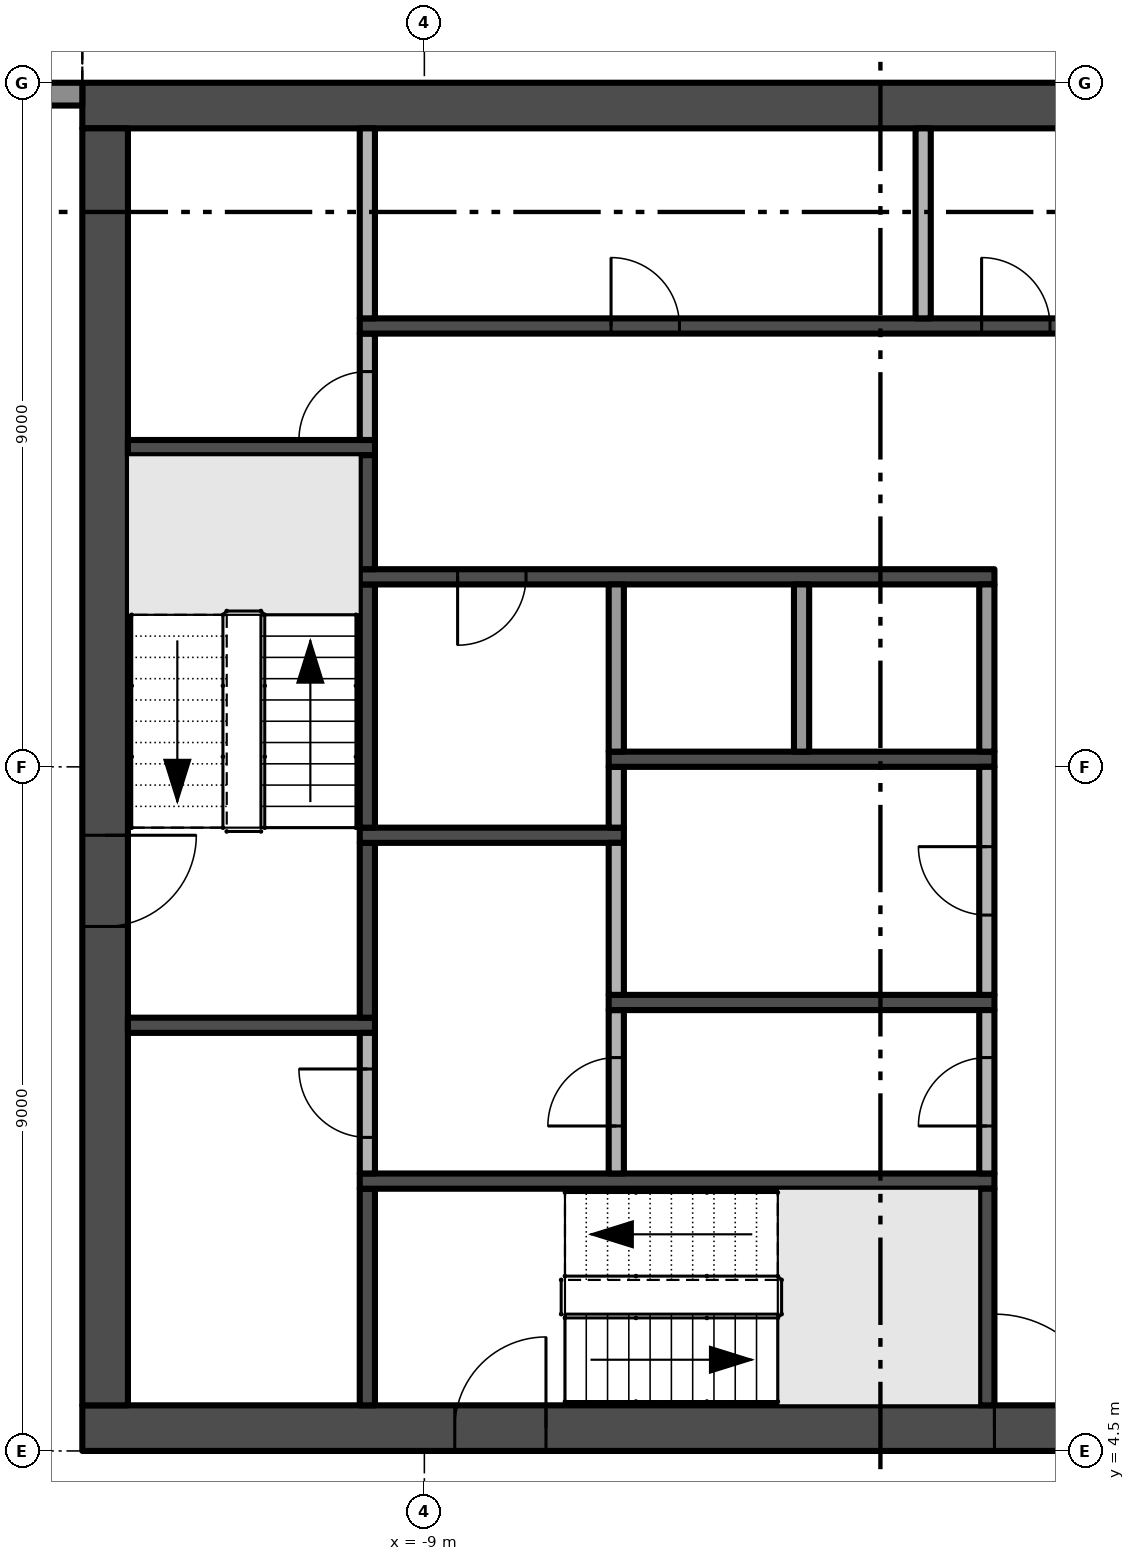
"""IFC4 building model, lengths in metres.
Left out: names, types, materials, properties, quantities, classifications, styles, units other than length and angle.
Written with IfcOpenShell. Run it as: python <this file> out.ifc"""

import sys

from ifc_helpers import new_model, si_unit, direction, frame, frame_2d, origin, place, context, subcontext, project, spatial, rectangle, extrude, element, fill, save


model = new_model("IFC4")
c1 = context("Model", 3, precision=1e-05, world=origin(), true_north=direction((0.0, 1.0)))
c2 = subcontext(c1, "Body", "Model", "MODEL_VIEW")
j1 = project(units=[si_unit("LENGTHUNIT", "METRE"), si_unit("PLANEANGLEUNIT", "RADIAN")], contexts=[c1])
p1 = place(None, origin())
s1 = spatial("IfcSite", under=j1, at=p1, CompositionType="ELEMENT")
p2 = place(p1, origin())
s2 = spatial("IfcBuilding", under=s1, at=p2, CompositionType="ELEMENT")
p3 = place(p2, frame((0.0, 0.0, 211.0)))
s3 = spatial("IfcBuildingStorey", under=s2, at=p3, CompositionType="ELEMENT", Elevation=211.0)
p4 = place(p3, frame((-13.5, 4.8, -0.3), z_axis=(0.0, 0.0, 1.0), x_axis=(1.0, 0.0, 0.0)))
e1 = element("IfcWall", 1, at=p4, inside=s3, PredefinedType="SHEAR", context=c2, shape_type="SweptSolid", body=[
    extrude(rectangle(XDim=27.0, YDim=0.6, at=frame_2d((13.5, 0.0))), origin(), (0.0, 0.0, 1.0), 3.8),
])
p5 = place(p4, frame((12.0, 0.0, 0.3)))
e2 = element("IfcOpeningElement", 2, at=p5, cuts=e1, PredefinedType="OPENING", context=c2, shape_type="SweptSolid", body=[
    extrude(rectangle(XDim=3.0, YDim=2.4, at=frame_2d((1.5, 1.2))), frame((0.0, 0.31, 0.0), z_axis=(0.0, -1.0, 0.0), x_axis=(1.0, 0.0, 0.0)), (0.0, 0.0, 1.0), 0.62),
])
p6 = place(p4, frame((4.9, 0.0, 0.3)))
e3 = element("IfcOpeningElement", 3, at=p6, cuts=e1, PredefinedType="OPENING", context=c2, shape_type="SweptSolid", body=[
    extrude(rectangle(XDim=1.2, YDim=2.2, at=frame_2d((0.6, 1.1))), frame((0.0, 0.31, 0.0), z_axis=(0.0, -1.0, 0.0), x_axis=(1.0, 0.0, 0.0)), (0.0, 0.0, 1.0), 0.62),
])
p7 = place(p4, frame((20.75, 0.0, 0.3)))
e4 = element("IfcOpeningElement", 4, at=p7, cuts=e1, PredefinedType="OPENING", context=c2, shape_type="SweptSolid", body=[
    extrude(rectangle(XDim=1.5, YDim=2.2, at=frame_2d((0.75, 1.1))), frame((0.0, 0.31, 0.0), z_axis=(0.0, -1.0, 0.0), x_axis=(1.0, 0.0, 0.0)), (0.0, 0.0, 1.0), 0.62),
])
p8 = place(p4, frame((17.4, 0.0, 0.3)))
e5 = element("IfcOpeningElement", 5, at=p8, cuts=e1, PredefinedType="OPENING", context=c2, shape_type="SweptSolid", body=[
    extrude(rectangle(XDim=1.2, YDim=2.2, at=frame_2d((0.6, 1.1))), frame((0.0, 0.31, 0.0), z_axis=(0.0, -1.0, 0.0), x_axis=(1.0, 0.0, 0.0)), (0.0, 0.0, 1.0), 0.62),
])
p9 = place(p3, frame((13.5, 22.2, -0.3), z_axis=(0.0, 0.0, 1.0), x_axis=(-1.0, 0.0, 0.0)))
e6 = element("IfcWall", 6, at=p9, inside=s3, PredefinedType="SHEAR", context=c2, shape_type="SweptSolid", body=[
    extrude(rectangle(XDim=27.0, YDim=0.6, at=frame_2d((13.5, 0.0))), origin(), (0.0, 0.0, 1.0), 3.8),
])
p10 = place(p3, frame((-13.2, 21.9, -0.3), z_axis=(0.0, 0.0, 1.0), x_axis=(0.0, -1.0, 0.0)))
e7 = element("IfcWall", 7, at=p10, inside=s3, PredefinedType="SHEAR", context=c2, shape_type="SweptSolid", body=[
    extrude(rectangle(XDim=16.8, YDim=0.6, at=frame_2d((8.4, 0.0))), origin(), (0.0, 0.0, 1.0), 3.8),
])
p11 = place(p10, frame((9.3, 0.0, 0.3)))
e8 = element("IfcOpeningElement", 8, at=p11, cuts=e7, PredefinedType="OPENING", context=c2, shape_type="SweptSolid", body=[
    extrude(rectangle(XDim=1.2, YDim=2.2, at=frame_2d((0.6, 1.1))), frame((0.0, 0.31, 0.0), z_axis=(0.0, -1.0, 0.0), x_axis=(1.0, 0.0, 0.0)), (0.0, 0.0, 1.0), 0.62),
])
p12 = place(p3, frame((-17.5, 22.35, 0.0), z_axis=(0.0, 0.0, 1.0), x_axis=(1.0, 0.0, 0.0)))
e9 = element("IfcWall", 9, at=p12, inside=s3, PredefinedType="SOLIDWALL", context=c2, shape_type="SweptSolid", body=[
    extrude(rectangle(XDim=4.0, YDim=0.3, at=frame_2d((2.0, 0.0))), origin(), (0.0, 0.0, 1.0), 3.5),
])
p13 = place(p12, frame((0.3, 0.0, 0.0)))
e10 = element("IfcOpeningElement", 10, at=p13, cuts=e9, PredefinedType="OPENING", context=c2, shape_type="SweptSolid", body=[
    extrude(rectangle(XDim=3.075, YDim=2.4, at=frame_2d((1.538, 1.2))), frame((0.0, 0.16, 0.0), z_axis=(0.0, -1.0, 0.0), x_axis=(1.0, 0.0, 0.0)), (0.0, 0.0, 1.0), 0.32),
])
for number, where, z_axis, x_axis in (
    (11, (-12.9, 10.1, 0.0), (0.0, 0.0, 1.0), (1.0, 0.0, 0.0)),
    (12, (-12.9, 17.7, 0.0), (0.0, 0.0, 1.0), (1.0, 0.0, 0.0)),
):
    element("IfcWall", number, at=place(p3, frame(where, z_axis=z_axis, x_axis=x_axis)), inside=s3, PredefinedType="SHEAR", context=c2, shape_type="SweptSolid", body=[
        extrude(rectangle(XDim=3.25, YDim=0.2, at=frame_2d((1.625, 0.0))), origin(), (0.0, 0.0, 1.0), 3.5),
    ])
p14 = place(p3, frame((-9.75, 5.1, 0.0), z_axis=(0.0, 0.0, 1.0), x_axis=(0.0, 1.0, 0.0)))
e13 = element("IfcWall", 13, at=p14, inside=s3, PredefinedType="SHEAR", context=c2, shape_type="SweptSolid", body=[
    extrude(rectangle(XDim=2.85, YDim=0.2, at=frame_2d((1.425, 0.0))), origin(), (0.0, 0.0, 1.0), 3.5),
])
p15 = place(p3, frame((-9.85, 8.05, 0.0), z_axis=(0.0, 0.0, 1.0), x_axis=(1.0, 0.0, 0.0)))
e14 = element("IfcWall", 14, at=p15, inside=s3, PredefinedType="SHEAR", context=c2, shape_type="SweptSolid", body=[
    extrude(rectangle(XDim=8.35, YDim=0.2, at=frame_2d((4.175, 0.0))), origin(), (0.0, 0.0, 1.0), 3.5),
])
p16 = place(p3, frame((-9.75, 8.15, 0.0), z_axis=(0.0, 0.0, 1.0), x_axis=(0.0, 1.0, 0.0)))
e15 = element("IfcWall", 15, at=p16, inside=s3, PredefinedType="PARTITIONING", context=c2, shape_type="SweptSolid", body=[
    extrude(rectangle(XDim=1.85, YDim=0.2, at=frame_2d((0.925, 0.0))), origin(), (0.0, 0.0, 1.0), 3.5),
])
p17 = place(p16, frame((0.475, 0.0, 0.0)))
e16 = element("IfcOpeningElement", 16, at=p17, cuts=e15, PredefinedType="OPENING", context=c2, shape_type="SweptSolid", body=[
    extrude(rectangle(XDim=0.9, YDim=2.1, at=frame_2d((0.45, 1.05))), frame((0.0, 0.11, 0.0), z_axis=(0.0, -1.0, 0.0), x_axis=(1.0, 0.0, 0.0)), (0.0, 0.0, 1.0), 0.22),
])
p18 = place(p3, frame((-9.75, 10.2, 0.0), z_axis=(0.0, 0.0, 1.0), x_axis=(0.0, 1.0, 0.0)))
e17 = element("IfcWall", 17, at=p18, inside=s3, PredefinedType="SHEAR", context=c2, shape_type="SweptSolid", body=[
    extrude(rectangle(XDim=2.3, YDim=0.2, at=frame_2d((1.15, 0.0))), origin(), (0.0, 0.0, 1.0), 3.5),
])
p19 = place(p3, frame((-9.85, 12.6, 0.0), z_axis=(0.0, 0.0, 1.0), x_axis=(1.0, 0.0, 0.0)))
e18 = element("IfcWall", 18, at=p19, inside=s3, PredefinedType="SHEAR", context=c2, shape_type="SweptSolid", body=[
    extrude(rectangle(XDim=3.475, YDim=0.2, at=frame_2d((1.738, 0.0))), origin(), (0.0, 0.0, 1.0), 3.5),
])
p20 = place(p3, frame((-9.75, 12.7, 0.0), z_axis=(0.0, 0.0, 1.0), x_axis=(0.0, 1.0, 0.0)))
e19 = element("IfcWall", 19, at=p20, inside=s3, PredefinedType="SHEAR", context=c2, shape_type="SweptSolid", body=[
    extrude(rectangle(XDim=3.2, YDim=0.2, at=frame_2d((1.6, 0.0))), origin(), (0.0, 0.0, 1.0), 3.5),
])
p21 = place(p3, frame((-1.5, 16.0, 0.0), z_axis=(0.0, 0.0, 1.0), x_axis=(-1.0, 0.0, 0.0)))
e20 = element("IfcWall", 20, at=p21, inside=s3, PredefinedType="SHEAR", context=c2, shape_type="SweptSolid", body=[
    extrude(rectangle(XDim=8.35, YDim=0.2, at=frame_2d((4.175, 0.0))), origin(), (0.0, 0.0, 1.0), 3.5),
])
p22 = place(p21, frame((6.162, 0.0, 0.0)))
e21 = element("IfcOpeningElement", 21, at=p22, cuts=e20, PredefinedType="OPENING", context=c2, shape_type="SweptSolid", body=[
    extrude(rectangle(XDim=0.9, YDim=2.1, at=frame_2d((0.45, 1.05))), frame((0.0, 0.11, 0.0), z_axis=(0.0, -1.0, 0.0), x_axis=(1.0, 0.0, 0.0)), (0.0, 0.0, 1.0), 0.22),
])
p23 = place(p3, frame((-9.75, 16.1, 0.0), z_axis=(0.0, 0.0, 1.0), x_axis=(0.0, 1.0, 0.0)))
e22 = element("IfcWall", 22, at=p23, inside=s3, PredefinedType="SHEAR", context=c2, shape_type="SweptSolid", body=[
    extrude(rectangle(XDim=1.5, YDim=0.2, at=frame_2d((0.75, 0.0))), origin(), (0.0, 0.0, 1.0), 3.5),
])
p24 = place(p3, frame((-9.75, 17.8, 0.0), z_axis=(0.0, 0.0, 1.0), x_axis=(0.0, 1.0, 0.0)))
e23 = element("IfcWall", 23, at=p24, inside=s3, PredefinedType="PARTITIONING", context=c2, shape_type="SweptSolid", body=[
    extrude(rectangle(XDim=1.4, YDim=0.2, at=frame_2d((0.7, 0.0))), origin(), (0.0, 0.0, 1.0), 3.5),
])
p25 = place(p24, origin())
e24 = element("IfcOpeningElement", 24, at=p25, cuts=e23, PredefinedType="OPENING", context=c2, shape_type="SweptSolid", body=[
    extrude(rectangle(XDim=0.9, YDim=2.1, at=frame_2d((0.45, 1.05))), frame((0.0, 0.11, 0.0), z_axis=(0.0, -1.0, 0.0), x_axis=(1.0, 0.0, 0.0)), (0.0, 0.0, 1.0), 0.22),
])
p26 = place(p3, frame((-9.85, 19.3, 0.0), z_axis=(0.0, 0.0, 1.0), x_axis=(1.0, 0.0, 0.0)))
e25 = element("IfcWall", 25, at=p26, inside=s3, PredefinedType="SHEAR", context=c2, shape_type="SweptSolid", body=[
    extrude(rectangle(XDim=19.7, YDim=0.2, at=frame_2d((9.85, 0.0))), origin(), (0.0, 0.0, 1.0), 3.5),
])
p27 = place(p26, frame((10.519, 0.0, 0.0)))
e26 = element("IfcOpeningElement", 26, at=p27, cuts=e25, PredefinedType="OPENING", context=c2, shape_type="SweptSolid", body=[
    extrude(rectangle(XDim=1.1, YDim=2.1, at=frame_2d((0.55, 1.05))), frame((0.0, 0.11, 0.0), z_axis=(0.0, -1.0, 0.0), x_axis=(1.0, 0.0, 0.0)), (0.0, 0.0, 1.0), 0.22),
])
p28 = place(p26, frame((12.956, 0.0, 0.0)))
e27 = element("IfcOpeningElement", 27, at=p28, cuts=e25, PredefinedType="OPENING", context=c2, shape_type="SweptSolid", body=[
    extrude(rectangle(XDim=1.1, YDim=2.1, at=frame_2d((0.55, 1.05))), frame((0.0, 0.11, 0.0), z_axis=(0.0, -1.0, 0.0), x_axis=(1.0, 0.0, 0.0)), (0.0, 0.0, 1.0), 0.22),
])
p29 = place(p26, frame((15.394, 0.0, 0.0)))
e28 = element("IfcOpeningElement", 28, at=p29, cuts=e25, PredefinedType="OPENING", context=c2, shape_type="SweptSolid", body=[
    extrude(rectangle(XDim=1.1, YDim=2.1, at=frame_2d((0.55, 1.05))), frame((0.0, 0.11, 0.0), z_axis=(0.0, -1.0, 0.0), x_axis=(1.0, 0.0, 0.0)), (0.0, 0.0, 1.0), 0.22),
])
p30 = place(p26, frame((17.831, 0.0, 0.0)))
e29 = element("IfcOpeningElement", 29, at=p30, cuts=e25, PredefinedType="OPENING", context=c2, shape_type="SweptSolid", body=[
    extrude(rectangle(XDim=1.1, YDim=2.1, at=frame_2d((0.55, 1.05))), frame((0.0, 0.11, 0.0), z_axis=(0.0, -1.0, 0.0), x_axis=(1.0, 0.0, 0.0)), (0.0, 0.0, 1.0), 0.22),
])
p31 = place(p26, frame((3.306, 0.0, 0.0)))
e30 = element("IfcOpeningElement", 30, at=p31, cuts=e25, PredefinedType="OPENING", context=c2, shape_type="SweptSolid", body=[
    extrude(rectangle(XDim=0.9, YDim=2.1, at=frame_2d((0.45, 1.05))), frame((0.0, 0.11, 0.0), z_axis=(0.0, -1.0, 0.0), x_axis=(1.0, 0.0, 0.0)), (0.0, 0.0, 1.0), 0.22),
])
p32 = place(p26, frame((8.181, 0.0, 0.0)))
e31 = element("IfcOpeningElement", 31, at=p32, cuts=e25, PredefinedType="OPENING", context=c2, shape_type="SweptSolid", body=[
    extrude(rectangle(XDim=0.9, YDim=2.1, at=frame_2d((0.45, 1.05))), frame((0.0, 0.11, 0.0), z_axis=(0.0, -1.0, 0.0), x_axis=(1.0, 0.0, 0.0)), (0.0, 0.0, 1.0), 0.22),
])
p33 = place(p3, frame((-9.75, 19.4, 0.0), z_axis=(0.0, 0.0, 1.0), x_axis=(0.0, 1.0, 0.0)))
e32 = element("IfcWall", 32, at=p33, inside=s3, PredefinedType="PARTITIONING", context=c2, shape_type="SweptSolid", body=[
    extrude(rectangle(XDim=2.5, YDim=0.2, at=frame_2d((1.25, 0.0))), origin(), (0.0, 0.0, 1.0), 3.5),
])
p34 = place(p3, frame((-6.475, 8.15, 0.0), z_axis=(0.0, 0.0, 1.0), x_axis=(0.0, 1.0, 0.0)))
e33 = element("IfcWall", 33, at=p34, inside=s3, PredefinedType="PARTITIONING", context=c2, shape_type="SweptSolid", body=[
    extrude(rectangle(XDim=2.15, YDim=0.2, at=frame_2d((1.075, 0.0))), origin(), (0.0, 0.0, 1.0), 3.5),
])
p35 = place(p34, frame((0.625, 0.0, 0.0)))
e34 = element("IfcOpeningElement", 34, at=p35, cuts=e33, PredefinedType="OPENING", context=c2, shape_type="SweptSolid", body=[
    extrude(rectangle(XDim=0.9, YDim=2.1, at=frame_2d((0.45, 1.05))), frame((0.0, 0.11, 0.0), z_axis=(0.0, -1.0, 0.0), x_axis=(1.0, 0.0, 0.0)), (0.0, 0.0, 1.0), 0.22),
])
p36 = place(p3, frame((-6.575, 10.4, 0.0), z_axis=(0.0, 0.0, 1.0), x_axis=(1.0, 0.0, 0.0)))
e35 = element("IfcWall", 35, at=p36, inside=s3, PredefinedType="SHEAR", context=c2, shape_type="SweptSolid", body=[
    extrude(rectangle(XDim=5.075, YDim=0.2, at=frame_2d((2.538, 0.0))), origin(), (0.0, 0.0, 1.0), 3.5),
])
p37 = place(p3, frame((-6.475, 10.5, 0.0), z_axis=(0.0, 0.0, 1.0), x_axis=(0.0, 1.0, 0.0)))
e36 = element("IfcWall", 36, at=p37, inside=s3, PredefinedType="PARTITIONING", context=c2, shape_type="SweptSolid", body=[
    extrude(rectangle(XDim=2.0, YDim=0.2, at=frame_2d((1.0, 0.0))), origin(), (0.0, 0.0, 1.0), 3.5),
])
p38 = place(p3, frame((-6.475, 12.7, 0.0), z_axis=(0.0, 0.0, 1.0), x_axis=(0.0, 1.0, 0.0)))
e37 = element("IfcWall", 37, at=p38, inside=s3, PredefinedType="PARTITIONING", context=c2, shape_type="SweptSolid", body=[
    extrude(rectangle(XDim=0.8, YDim=0.2, at=frame_2d((0.4, 0.0))), origin(), (0.0, 0.0, 1.0), 3.5),
])
p39 = place(p3, frame((-6.575, 13.6, 0.0), z_axis=(0.0, 0.0, 1.0), x_axis=(1.0, 0.0, 0.0)))
e38 = element("IfcWall", 38, at=p39, inside=s3, PredefinedType="SHEAR", context=c2, shape_type="SweptSolid", body=[
    extrude(rectangle(XDim=5.075, YDim=0.2, at=frame_2d((2.538, 0.0))), origin(), (0.0, 0.0, 1.0), 3.5),
])
for number, where, z_axis, x_axis in (
    (39, (-6.475, 13.7, 0.0), (0.0, 0.0, 1.0), (0.0, 1.0, 0.0)),
    (40, (-4.037, 13.7, 0.0), (0.0, 0.0, 1.0), (0.0, 1.0, 0.0)),
):
    element("IfcWall", number, at=place(p3, frame(where, z_axis=z_axis, x_axis=x_axis)), inside=s3, PredefinedType="PARTITIONING", context=c2, shape_type="SweptSolid", body=[
        extrude(rectangle(XDim=2.2, YDim=0.2, at=frame_2d((1.1, 0.0))), origin(), (0.0, 0.0, 1.0), 3.5),
    ])
p40 = place(p3, frame((-2.438, 19.4, 0.0), z_axis=(0.0, 0.0, 1.0), x_axis=(0.0, 1.0, 0.0)))
e41 = element("IfcWall", 41, at=p40, inside=s3, PredefinedType="PARTITIONING", context=c2, shape_type="SweptSolid", body=[
    extrude(rectangle(XDim=2.5, YDim=0.2, at=frame_2d((1.25, 0.0))), origin(), (0.0, 0.0, 1.0), 3.5),
])
p41 = place(p3, frame((-1.6, 5.1, 0.0), z_axis=(0.0, 0.0, 1.0), x_axis=(0.0, 1.0, 0.0)))
e42 = element("IfcWall", 42, at=p41, inside=s3, PredefinedType="SHEAR", context=c2, shape_type="SweptSolid", body=[
    extrude(rectangle(XDim=2.85, YDim=0.2, at=frame_2d((1.425, 0.0))), origin(), (0.0, 0.0, 1.0), 3.5),
])
p42 = place(p3, frame((-1.6, 8.15, 0.0), z_axis=(0.0, 0.0, 1.0), x_axis=(0.0, 1.0, 0.0)))
e43 = element("IfcWall", 43, at=p42, inside=s3, PredefinedType="PARTITIONING", context=c2, shape_type="SweptSolid", body=[
    extrude(rectangle(XDim=2.15, YDim=0.2, at=frame_2d((1.075, 0.0))), origin(), (0.0, 0.0, 1.0), 3.5),
])
p43 = place(p42, frame((0.625, 0.0, 0.0)))
e44 = element("IfcOpeningElement", 44, at=p43, cuts=e43, PredefinedType="OPENING", context=c2, shape_type="SweptSolid", body=[
    extrude(rectangle(XDim=0.9, YDim=2.1, at=frame_2d((0.45, 1.05))), frame((0.0, 0.11, 0.0), z_axis=(0.0, -1.0, 0.0), x_axis=(1.0, 0.0, 0.0)), (0.0, 0.0, 1.0), 0.22),
])
p44 = place(p3, frame((-1.6, 10.5, 0.0), z_axis=(0.0, 0.0, 1.0), x_axis=(0.0, 1.0, 0.0)))
e45 = element("IfcWall", 45, at=p44, inside=s3, PredefinedType="PARTITIONING", context=c2, shape_type="SweptSolid", body=[
    extrude(rectangle(XDim=3.0, YDim=0.2, at=frame_2d((1.5, 0.0))), origin(), (0.0, 0.0, 1.0), 3.5),
])
p45 = place(p44, frame((1.05, 0.0, 0.0)))
e46 = element("IfcOpeningElement", 46, at=p45, cuts=e45, PredefinedType="OPENING", context=c2, shape_type="SweptSolid", body=[
    extrude(rectangle(XDim=0.9, YDim=2.1, at=frame_2d((0.45, 1.05))), frame((0.0, 0.11, 0.0), z_axis=(0.0, -1.0, 0.0), x_axis=(1.0, 0.0, 0.0)), (0.0, 0.0, 1.0), 0.22),
])
p46 = place(p3, frame((-1.6, 13.7, 0.0), z_axis=(0.0, 0.0, 1.0), x_axis=(0.0, 1.0, 0.0)))
e47 = element("IfcWall", 47, at=p46, inside=s3, PredefinedType="PARTITIONING", context=c2, shape_type="SweptSolid", body=[
    extrude(rectangle(XDim=2.2, YDim=0.2, at=frame_2d((1.1, 0.0))), origin(), (0.0, 0.0, 1.0), 3.5),
])
p47 = place(p5, frame((3.0, 0.0, 0.0), z_axis=(0.0, 0.0, 1.0), x_axis=(-1.0, 0.0, 0.0)))
e48 = element("IfcDoor", 48, at=p47, inside=s3, OperationType="DOUBLE_DOOR_SINGLE_SWING", PredefinedType="DOOR", context=c2, shape_type="SweptSolid", body=[
    extrude(rectangle(XDim=3.0, YDim=2.4, at=frame_2d((1.5, 1.2))), frame((0.0, 0.025, 0.0), z_axis=(0.0, -1.0, 0.0), x_axis=(1.0, 0.0, 0.0)), (0.0, 0.0, 1.0), 0.05),
])
fill(e2, e48)
p48 = place(p11, frame((1.2, 0.0, 0.0), z_axis=(0.0, 0.0, 1.0), x_axis=(-1.0, 0.0, 0.0)))
e49 = element("IfcDoor", 49, at=p48, inside=s3, OperationType="SINGLE_SWING_RIGHT", PredefinedType="DOOR", context=c2, shape_type="SweptSolid", body=[
    extrude(rectangle(XDim=1.2, YDim=2.2, at=frame_2d((0.6, 1.1))), frame((0.0, 0.025, 0.0), z_axis=(0.0, -1.0, 0.0), x_axis=(1.0, 0.0, 0.0)), (0.0, 0.0, 1.0), 0.05),
])
fill(e8, e49)
p49 = place(p6, frame((1.2, 0.0, 0.0), z_axis=(0.0, 0.0, 1.0), x_axis=(-1.0, 0.0, 0.0)))
e50 = element("IfcDoor", 50, at=p49, inside=s3, OperationType="SINGLE_SWING_LEFT", PredefinedType="DOOR", context=c2, shape_type="SweptSolid", body=[
    extrude(rectangle(XDim=1.2, YDim=2.2, at=frame_2d((0.6, 1.1))), frame((0.0, 0.025, 0.0), z_axis=(0.0, -1.0, 0.0), x_axis=(1.0, 0.0, 0.0)), (0.0, 0.0, 1.0), 0.05),
])
fill(e3, e50)
p50 = place(p22, origin())
e51 = element("IfcDoor", 51, at=p50, inside=s3, OperationType="SINGLE_SWING_RIGHT", PredefinedType="DOOR", context=c2, shape_type="SweptSolid", body=[
    extrude(rectangle(XDim=0.9, YDim=2.1, at=frame_2d((0.45, 1.05))), frame((0.0, 0.025, 0.0), z_axis=(0.0, -1.0, 0.0), x_axis=(1.0, 0.0, 0.0)), (0.0, 0.0, 1.0), 0.05),
])
fill(e21, e51)
p51 = place(p43, origin())
e52 = element("IfcDoor", 52, at=p51, inside=s3, OperationType="SINGLE_SWING_LEFT", PredefinedType="DOOR", context=c2, shape_type="SweptSolid", body=[
    extrude(rectangle(XDim=0.9, YDim=2.1, at=frame_2d((0.45, 1.05))), frame((0.0, 0.025, 0.0), z_axis=(0.0, -1.0, 0.0), x_axis=(1.0, 0.0, 0.0)), (0.0, 0.0, 1.0), 0.05),
])
fill(e44, e52)
p52 = place(p45, origin())
e53 = element("IfcDoor", 53, at=p52, inside=s3, OperationType="SINGLE_SWING_RIGHT", PredefinedType="DOOR", context=c2, shape_type="SweptSolid", body=[
    extrude(rectangle(XDim=0.9, YDim=2.1, at=frame_2d((0.45, 1.05))), frame((0.0, 0.025, 0.0), z_axis=(0.0, -1.0, 0.0), x_axis=(1.0, 0.0, 0.0)), (0.0, 0.0, 1.0), 0.05),
])
fill(e46, e53)
p53 = place(p25, origin())
e54 = element("IfcDoor", 54, at=p53, inside=s3, OperationType="SINGLE_SWING_LEFT", PredefinedType="DOOR", context=c2, shape_type="SweptSolid", body=[
    extrude(rectangle(XDim=0.9, YDim=2.1, at=frame_2d((0.45, 1.05))), frame((0.0, 0.025, 0.0), z_axis=(0.0, -1.0, 0.0), x_axis=(1.0, 0.0, 0.0)), (0.0, 0.0, 1.0), 0.05),
])
fill(e24, e54)
p54 = place(p31, origin())
e55 = element("IfcDoor", 55, at=p54, inside=s3, OperationType="SINGLE_SWING_LEFT", PredefinedType="DOOR", context=c2, shape_type="SweptSolid", body=[
    extrude(rectangle(XDim=0.9, YDim=2.1, at=frame_2d((0.45, 1.05))), frame((0.0, 0.025, 0.0), z_axis=(0.0, -1.0, 0.0), x_axis=(1.0, 0.0, 0.0)), (0.0, 0.0, 1.0), 0.05),
])
fill(e30, e55)
p55 = place(p32, origin())
e56 = element("IfcDoor", 56, at=p55, inside=s3, OperationType="SINGLE_SWING_LEFT", PredefinedType="DOOR", context=c2, shape_type="SweptSolid", body=[
    extrude(rectangle(XDim=0.9, YDim=2.1, at=frame_2d((0.45, 1.05))), frame((0.0, 0.025, 0.0), z_axis=(0.0, -1.0, 0.0), x_axis=(1.0, 0.0, 0.0)), (0.0, 0.0, 1.0), 0.05),
])
fill(e31, e56)
p56 = place(p35, origin())
e57 = element("IfcDoor", 57, at=p56, inside=s3, OperationType="SINGLE_SWING_LEFT", PredefinedType="DOOR", context=c2, shape_type="SweptSolid", body=[
    extrude(rectangle(XDim=0.9, YDim=2.1, at=frame_2d((0.45, 1.05))), frame((0.0, 0.025, 0.0), z_axis=(0.0, -1.0, 0.0), x_axis=(1.0, 0.0, 0.0)), (0.0, 0.0, 1.0), 0.05),
])
fill(e34, e57)
p57 = place(p17, origin())
e58 = element("IfcDoor", 58, at=p57, inside=s3, OperationType="SINGLE_SWING_RIGHT", PredefinedType="DOOR", context=c2, shape_type="SweptSolid", body=[
    extrude(rectangle(XDim=0.9, YDim=2.1, at=frame_2d((0.45, 1.05))), frame((0.0, 0.025, 0.0), z_axis=(0.0, -1.0, 0.0), x_axis=(1.0, 0.0, 0.0)), (0.0, 0.0, 1.0), 0.05),
])
fill(e16, e58)
save(model, sys.argv[1])
